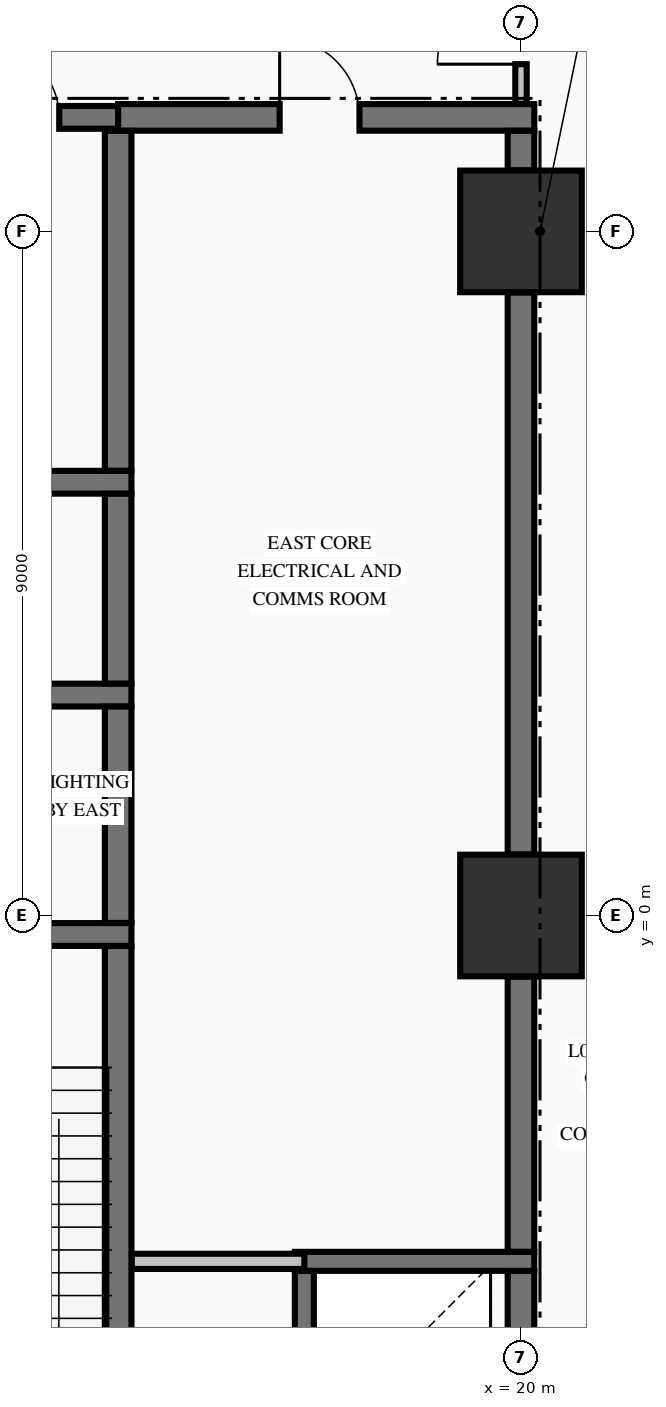
"""IFC4 building model, lengths in metres.
Left out: names, types, materials, properties, quantities, classifications, styles, units other than length and angle.
Written with IfcOpenShell. Run it as: python <this file> out.ifc"""

import sys

from ifc_helpers import new_model, si_unit, direction, frame, frame_2d, origin, origin_2d, place, context, subcontext, project, spatial, rectangle, extrude, element, fill, save


model = new_model("IFC4")
c1 = context("Model", 3, precision=1e-05, world=origin(), true_north=direction((0.0, 1.0)))
c2 = subcontext(c1, "Body", "Model", "MODEL_VIEW")
j1 = project(units=[si_unit("LENGTHUNIT", "METRE"), si_unit("PLANEANGLEUNIT", "RADIAN")], contexts=[c1])
p1 = place(None, origin())
s1 = spatial("IfcSite", under=j1, at=p1, CompositionType="ELEMENT")
p2 = place(p1, origin())
s2 = spatial("IfcBuilding", under=s1, at=p2, CompositionType="ELEMENT")
p3 = place(p2, frame((0.0, 0.0, 10.88)))
s3 = spatial("IfcBuildingStorey", under=s2, at=p3, CompositionType="ELEMENT", Elevation=10.88)
for number, where, z_axis, x_axis in (
    (1, (20.0, 0.0, 0.0), (0.0, 0.0, 1.0), (1.0, 0.0, 0.0)),
    (2, (20.0, 9.0, 0.0), (0.0, 0.0, 1.0), (1.0, 0.0, 0.0)),
):
    element("IfcColumn", number, at=place(p3, frame(where, z_axis=z_axis, x_axis=x_axis)), inside=s3, PredefinedType="COLUMN", context=c2, shape_type="SweptSolid", body=[
        extrude(rectangle(XDim=1.6, YDim=1.6, at=origin_2d()), origin(), (0.0, 0.0, 1.0), 5.09),
    ])
p4 = place(p3, frame((17.025, -4.55, 0.0), z_axis=(0.0, 0.0, 1.0), x_axis=(1.0, 0.0, 0.0)))
e3 = element("IfcWall", 3, at=p4, inside=s3, PredefinedType="SOLIDWALL", context=c2, shape_type="SweptSolid", body=[
    extrude(rectangle(XDim=3.15, YDim=0.25, at=frame_2d((1.575, 0.0))), origin(), (0.0, 0.0, 1.0), 5.09),
])
p5 = place(p3, frame((11.804, -0.25, 0.0), z_axis=(0.0, 0.0, 1.0), x_axis=(1.0, 0.0, 0.0)))
e4 = element("IfcWall", 4, at=p5, inside=s3, PredefinedType="SHEAR", context=c2, shape_type="SweptSolid", body=[
    extrude(rectangle(XDim=3.071, YDim=0.3, at=frame_2d((1.536, 0.0))), origin(), (0.0, 0.0, 1.0), 5.09),
])
p6 = place(p5, frame((0.796, 0.0, 0.0)))
e5 = element("IfcOpeningElement", 5, at=p6, cuts=e4, PredefinedType="OPENING", context=c2, shape_type="SweptSolid", body=[
    extrude(rectangle(XDim=1.1, YDim=2.15, at=frame_2d((0.55, 1.075))), frame((0.0, 0.16, 0.0), z_axis=(0.0, -1.0, 0.0), x_axis=(1.0, 0.0, 0.0)), (0.0, 0.0, 1.0), 0.32),
])
p7 = place(p3, frame((10.85, 2.9, 0.0), z_axis=(0.0, 0.0, 1.0), x_axis=(1.0, 0.0, 0.0)))
e6 = element("IfcWall", 6, at=p7, inside=s3, PredefinedType="SHEAR", context=c2, shape_type="SweptSolid", body=[
    extrude(rectangle(XDim=4.025, YDim=0.3, at=frame_2d((2.012, 0.0))), origin(), (0.0, 0.0, 1.0), 5.09),
])
p8 = place(p7, frame((0.85, 0.0, 0.0)))
e7 = element("IfcOpeningElement", 7, at=p8, cuts=e6, PredefinedType="OPENING", context=c2, shape_type="SweptSolid", body=[
    extrude(rectangle(XDim=1.1, YDim=2.2, at=frame_2d((0.55, 1.1))), frame((0.0, 0.16, 0.0), z_axis=(0.0, -1.0, 0.0), x_axis=(1.0, 0.0, 0.0)), (0.0, 0.0, 1.0), 0.32),
])
p9 = place(p3, frame((10.85, 5.7, 0.0), z_axis=(0.0, 0.0, 1.0), x_axis=(1.0, 0.0, 0.0)))
e8 = element("IfcWall", 8, at=p9, inside=s3, PredefinedType="SHEAR", context=c2, shape_type="SweptSolid", body=[
    extrude(rectangle(XDim=4.025, YDim=0.3, at=frame_2d((2.012, 0.0))), origin(), (0.0, 0.0, 1.0), 5.09),
])
p10 = place(p3, frame((10.85, 10.5, 0.0), z_axis=(0.0, 0.0, 1.0), x_axis=(1.0, 0.0, 0.0)))
e9 = element("IfcWall", 9, at=p10, inside=s3, PredefinedType="SHEAR", context=c2, shape_type="SweptSolid", body=[
    extrude(rectangle(XDim=3.85, YDim=0.3, at=frame_2d((1.925, 0.0))), origin(), (0.0, 0.0, 1.0), 5.09),
])
p11 = place(p10, frame((2.125, 0.0, 0.0)))
e10 = element("IfcOpeningElement", 10, at=p11, cuts=e9, PredefinedType="OPENING", context=c2, shape_type="SweptSolid", body=[
    extrude(rectangle(XDim=0.95, YDim=2.15, at=frame_2d((0.475, 1.075))), frame((0.0, 0.16, 0.0), z_axis=(0.0, -1.0, 0.0), x_axis=(1.0, 0.0, 0.0)), (0.0, 0.0, 1.0), 0.32),
])
p12 = place(p3, frame((14.7, 10.5, 0.0), z_axis=(0.0, 0.0, 1.0), x_axis=(1.0, 0.0, 0.0)))
e11 = element("IfcWall", 11, at=p12, inside=s3, PredefinedType="SHEAR", context=c2, shape_type="SweptSolid", body=[
    extrude(rectangle(XDim=5.475, YDim=0.35, at=frame_2d((2.738, 0.0))), origin(), (0.0, 0.0, 1.0), 5.09),
])
p13 = place(p12, frame((2.125, 0.0, 0.0)))
e12 = element("IfcOpeningElement", 12, at=p13, cuts=e11, PredefinedType="OPENING", context=c2, shape_type="SweptSolid", body=[
    extrude(rectangle(XDim=1.05, YDim=2.15, at=frame_2d((0.525, 1.075))), frame((0.0, 0.185, 0.0), z_axis=(0.0, -1.0, 0.0), x_axis=(1.0, 0.0, 0.0)), (0.0, 0.0, 1.0), 0.37),
])
p14 = place(p3, frame((14.878, -4.55, 0.0), z_axis=(0.0, 0.0, 1.0), x_axis=(1.0, 0.0, 0.0)))
e13 = element("IfcWall", 13, at=p14, inside=s3, PredefinedType="PARTITIONING", context=c2, shape_type="SweptSolid", body=[
    extrude(rectangle(XDim=2.272, YDim=0.2, at=frame_2d((1.136, 0.0))), origin(), (0.0, 0.0, 1.0), 5.09),
])
p15 = place(p3, frame((14.7, -9.773, 0.0), z_axis=(0.0, 0.0, 1.0), x_axis=(0.0, 1.0, 0.0)))
e14 = element("IfcWall", 14, at=p15, inside=s3, PredefinedType="SHEAR", context=c2, shape_type="SweptSolid", body=[
    extrude(rectangle(XDim=9.371, YDim=0.35, at=frame_2d((4.686, 0.0))), origin(), (0.0, 0.0, 1.0), 5.09),
])
p16 = place(p3, frame((14.7, -0.098, 0.0), z_axis=(0.0, 0.0, 1.0), x_axis=(0.0, 1.0, 0.0)))
e15 = element("IfcWall", 15, at=p16, inside=s3, PredefinedType="SHEAR", context=c2, shape_type="SweptSolid", body=[
    extrude(rectangle(XDim=2.846, YDim=0.35, at=frame_2d((1.423, 0.0))), origin(), (0.0, 0.0, 1.0), 5.09),
])
p17 = place(p3, frame((14.7, 3.052, 0.0), z_axis=(0.0, 0.0, 1.0), x_axis=(0.0, 1.0, 0.0)))
e16 = element("IfcWall", 16, at=p17, inside=s3, PredefinedType="SHEAR", context=c2, shape_type="SweptSolid", body=[
    extrude(rectangle(XDim=2.496, YDim=0.35, at=frame_2d((1.248, 0.0))), origin(), (0.0, 0.0, 1.0), 5.09),
])
p18 = place(p3, frame((14.7, 5.852, 0.0), z_axis=(0.0, 0.0, 1.0), x_axis=(0.0, 1.0, 0.0)))
e17 = element("IfcWall", 17, at=p18, inside=s3, PredefinedType="SHEAR", context=c2, shape_type="SweptSolid", body=[
    extrude(rectangle(XDim=4.471, YDim=0.35, at=frame_2d((2.235, 0.0))), origin(), (0.0, 0.0, 1.0), 5.09),
])
p19 = place(p3, frame((17.15, -6.923, 0.0), z_axis=(0.0, 0.0, 1.0), x_axis=(0.0, 1.0, 0.0)))
e18 = element("IfcWall", 18, at=p19, inside=s3, PredefinedType="SOLIDWALL", context=c2, shape_type="SweptSolid", body=[
    extrude(rectangle(XDim=2.246, YDim=0.25, at=frame_2d((1.123, 0.0))), origin(), (0.0, 0.0, 1.0), 5.09),
])
p20 = place(p3, frame((20.0, -6.923, 0.0), z_axis=(0.0, 0.0, 1.0), x_axis=(0.0, 1.0, 0.0)))
e19 = element("IfcWall", 19, at=p20, inside=s3, PredefinedType="SHEAR", context=c2, shape_type="SweptSolid", body=[
    extrude(rectangle(XDim=2.246, YDim=0.35, at=frame_2d((1.123, 0.0))), origin(), (0.0, 0.0, 1.0), 5.09),
])
p21 = place(p3, frame((20.0, -4.423, 0.0), z_axis=(0.0, 0.0, 1.0), x_axis=(0.0, 1.0, 0.0)))
e20 = element("IfcWall", 20, at=p21, inside=s3, PredefinedType="SHEAR", context=c2, shape_type="SweptSolid", body=[
    extrude(rectangle(XDim=3.619, YDim=0.35, at=frame_2d((1.81, 0.0))), origin(), (0.0, 0.0, 1.0), 5.09),
])
p22 = place(p3, frame((20.0, 0.804, 0.0), z_axis=(0.0, 0.0, 1.0), x_axis=(0.0, 1.0, 0.0)))
e21 = element("IfcWall", 21, at=p22, inside=s3, PredefinedType="SHEAR", context=c2, shape_type="SweptSolid", body=[
    extrude(rectangle(XDim=7.392, YDim=0.35, at=frame_2d((3.696, 0.0))), origin(), (0.0, 0.0, 1.0), 5.09),
])
p23 = place(p3, frame((20.0, 9.804, 0.0), z_axis=(0.0, 0.0, 1.0), x_axis=(0.0, 1.0, 0.0)))
e22 = element("IfcWall", 22, at=p23, inside=s3, PredefinedType="SHEAR", context=c2, shape_type="SweptSolid", body=[
    extrude(rectangle(XDim=0.519, YDim=0.35, at=frame_2d((0.26, 0.0))), origin(), (0.0, 0.0, 1.0), 5.09),
])
p24 = place(p3, frame((20.0, 10.678, 0.0), z_axis=(0.0, 0.0, 1.0), x_axis=(0.0, 1.0, 0.0)))
e23 = element("IfcWall", 23, at=p24, inside=s3, PredefinedType="PARTITIONING", context=c2, shape_type="SweptSolid", body=[
    extrude(rectangle(XDim=2.244, YDim=0.15, at=frame_2d((1.122, 0.0))), origin(), (0.0, 0.0, 1.0), 4.132),
])
p25 = place(p24, frame((0.522, 0.0, 0.0)))
e24 = element("IfcOpeningElement", 24, at=p25, cuts=e23, PredefinedType="OPENING", context=c2, shape_type="SweptSolid", body=[
    extrude(rectangle(XDim=1.1, YDim=2.15, at=frame_2d((0.55, 1.075))), frame((0.0, 0.085, 0.0), z_axis=(0.0, -1.0, 0.0), x_axis=(1.0, 0.0, 0.0)), (0.0, 0.0, 1.0), 0.17),
])
p26 = place(p11, origin())
e25 = element("IfcDoor", 25, at=p26, inside=s3, OperationType="SINGLE_SWING_LEFT", PredefinedType="DOOR", context=c2, shape_type="SweptSolid", body=[
    extrude(rectangle(XDim=0.95, YDim=2.15, at=frame_2d((0.475, 1.075))), frame((0.0, 0.025, 0.0), z_axis=(0.0, -1.0, 0.0), x_axis=(1.0, 0.0, 0.0)), (0.0, 0.0, 1.0), 0.05),
])
fill(e10, e25)
p27 = place(p13, origin())
e26 = element("IfcDoor", 26, at=p27, inside=s3, OperationType="SINGLE_SWING_LEFT", PredefinedType="DOOR", context=c2, shape_type="SweptSolid", body=[
    extrude(rectangle(XDim=1.05, YDim=2.15, at=frame_2d((0.525, 1.075))), frame((0.0, 0.025, 0.0), z_axis=(0.0, -1.0, 0.0), x_axis=(1.0, 0.0, 0.0)), (0.0, 0.0, 1.0), 0.05),
])
fill(e12, e26)
p28 = place(p25, origin())
e27 = element("IfcDoor", 27, at=p28, inside=s3, OperationType="SINGLE_SWING_LEFT", PredefinedType="DOOR", context=c2, shape_type="SweptSolid", body=[
    extrude(rectangle(XDim=1.1, YDim=2.15, at=frame_2d((0.55, 1.075))), frame((0.0, 0.025, 0.0), z_axis=(0.0, -1.0, 0.0), x_axis=(1.0, 0.0, 0.0)), (0.0, 0.0, 1.0), 0.05),
])
fill(e24, e27)
save(model, sys.argv[1])
